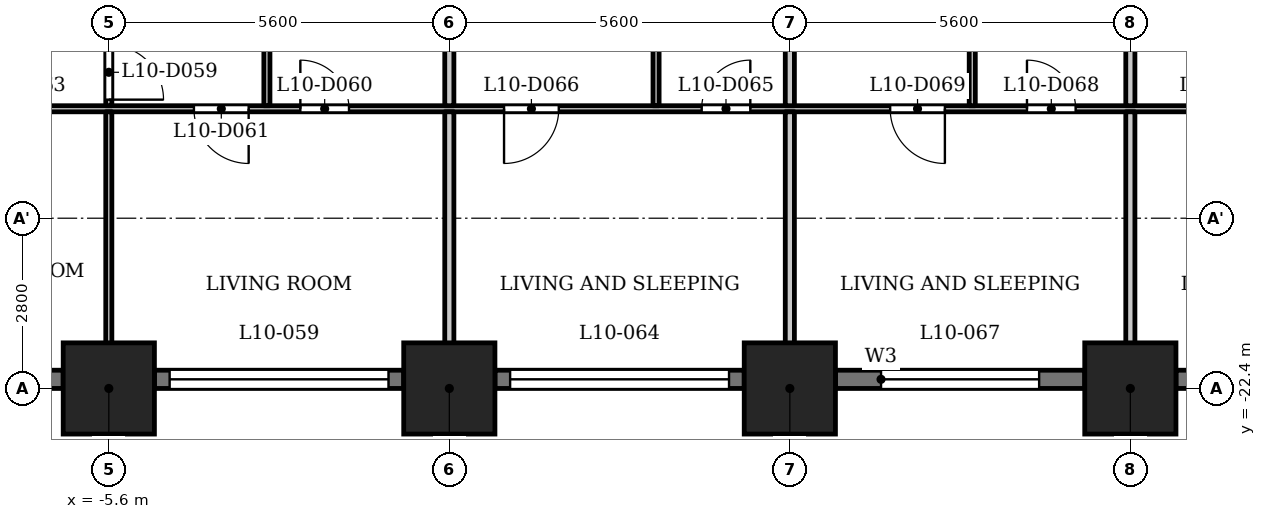
"""IFC4 building model, lengths in metres.
Left out: names, types, materials, properties, quantities, classifications, styles, units other than length and angle.
Written with IfcOpenShell. Run it as: python <this file> out.ifc"""

import sys

from ifc_helpers import new_model, si_unit, direction, frame, frame_2d, origin, origin_2d, place, context, subcontext, project, spatial, rectangle, extrude, element, fill, save


model = new_model("IFC4")
c1 = context("Model", 3, precision=1e-05, world=origin(), true_north=direction((0.0, 1.0)))
c2 = subcontext(c1, "Body", "Model", "MODEL_VIEW")
j1 = project(units=[si_unit("LENGTHUNIT", "METRE"), si_unit("PLANEANGLEUNIT", "RADIAN")], contexts=[c1])
p1 = place(None, origin())
s1 = spatial("IfcSite", under=j1, at=p1, CompositionType="ELEMENT")
p2 = place(p1, origin())
s2 = spatial("IfcBuilding", under=s1, at=p2, CompositionType="ELEMENT")
p3 = place(p2, frame((0.0, 0.0, 44.5)))
s3 = spatial("IfcBuildingStorey", under=s2, at=p3, CompositionType="ELEMENT", Elevation=44.5)
for number, where, z_axis, x_axis in (
    (1, (-5.6, -22.4, 0.0), (0.0, 0.0, 1.0), (1.0, 0.0, 0.0)),
    (2, (0.0, -22.4, 0.0), (0.0, 0.0, 1.0), (1.0, 0.0, 0.0)),
    (3, (5.6, -22.4, 0.0), (0.0, 0.0, 1.0), (1.0, 0.0, 0.0)),
    (4, (11.2, -22.4, 0.0), (0.0, 0.0, 1.0), (1.0, 0.0, 0.0)),
):
    element("IfcColumn", number, at=place(p3, frame(where, z_axis=z_axis, x_axis=x_axis)), inside=s3, PredefinedType="COLUMN", context=c2, shape_type="SweptSolid", body=[
        extrude(rectangle(XDim=1.5, YDim=1.5, at=origin_2d()), origin(), (0.0, 0.0, 1.0), 3.5),
    ])
p4 = place(p3, frame((-10.45, -22.25, 0.0), z_axis=(0.0, 0.0, 1.0), x_axis=(1.0, 0.0, 0.0)))
e5 = element("IfcWall", 5, at=p4, inside=s3, PredefinedType="SOLIDWALL", context=c2, shape_type="SweptSolid", body=[
    extrude(rectangle(XDim=4.1, YDim=0.3, at=frame_2d((2.05, 0.0))), origin(), (0.0, 0.0, 1.0), 2.35),
])
p5 = place(p4, frame((0.488, 0.0, 0.6)))
e6 = element("IfcOpeningElement", 6, at=p5, cuts=e5, PredefinedType="OPENING", context=c2, shape_type="SweptSolid", body=[
    extrude(rectangle(XDim=1.2, YDim=1.55, at=frame_2d((0.6, 0.775))), frame((0.0, 0.16, 0.0), z_axis=(0.0, -1.0, 0.0), x_axis=(1.0, 0.0, 0.0)), (0.0, 0.0, 1.0), 0.32),
])
p6 = place(p4, frame((2.613, 0.0, 0.6)))
e7 = element("IfcOpeningElement", 7, at=p6, cuts=e5, PredefinedType="OPENING", context=c2, shape_type="SweptSolid", body=[
    extrude(rectangle(XDim=1.2, YDim=1.55, at=frame_2d((0.6, 0.775))), frame((0.0, 0.16, 0.0), z_axis=(0.0, -1.0, 0.0), x_axis=(1.0, 0.0, 0.0)), (0.0, 0.0, 1.0), 0.32),
])
p7 = place(p3, frame((-4.85, -22.25, 0.0), z_axis=(0.0, 0.0, 1.0), x_axis=(1.0, 0.0, 0.0)))
e8 = element("IfcWall", 8, at=p7, inside=s3, PredefinedType="SOLIDWALL", context=c2, shape_type="SweptSolid", body=[
    extrude(rectangle(XDim=4.1, YDim=0.3, at=frame_2d((2.05, 0.0))), origin(), (0.0, 0.0, 1.0), 2.35),
])
p8 = place(p7, frame((0.25, 0.0, 1.2)))
e9 = element("IfcOpeningElement", 9, at=p8, cuts=e8, PredefinedType="OPENING", context=c2, shape_type="SweptSolid", body=[
    extrude(rectangle(XDim=3.6, YDim=0.95, at=frame_2d((1.8, 0.475))), frame((0.0, 0.16, 0.0), z_axis=(0.0, -1.0, 0.0), x_axis=(1.0, 0.0, 0.0)), (0.0, 0.0, 1.0), 0.32),
])
p9 = place(p3, frame((0.75, -22.25, 0.0), z_axis=(0.0, 0.0, 1.0), x_axis=(1.0, 0.0, 0.0)))
e10 = element("IfcWall", 10, at=p9, inside=s3, PredefinedType="SOLIDWALL", context=c2, shape_type="SweptSolid", body=[
    extrude(rectangle(XDim=4.1, YDim=0.3, at=frame_2d((2.05, 0.0))), origin(), (0.0, 0.0, 1.0), 2.35),
])
p10 = place(p9, frame((0.25, 0.0, 1.2)))
e11 = element("IfcOpeningElement", 11, at=p10, cuts=e10, PredefinedType="OPENING", context=c2, shape_type="SweptSolid", body=[
    extrude(rectangle(XDim=3.6, YDim=0.95, at=frame_2d((1.8, 0.475))), frame((0.0, 0.16, 0.0), z_axis=(0.0, -1.0, 0.0), x_axis=(1.0, 0.0, 0.0)), (0.0, 0.0, 1.0), 0.32),
])
p11 = place(p3, frame((6.35, -22.25, 0.0), z_axis=(0.0, 0.0, 1.0), x_axis=(1.0, 0.0, 0.0)))
e12 = element("IfcWall", 12, at=p11, inside=s3, PredefinedType="SOLIDWALL", context=c2, shape_type="SweptSolid", body=[
    extrude(rectangle(XDim=4.1, YDim=0.3, at=frame_2d((2.05, 0.0))), origin(), (0.0, 0.0, 1.0), 2.35),
])
p12 = place(p11, frame((0.75, 0.0, 0.9)))
e13 = element("IfcOpeningElement", 13, at=p12, cuts=e12, PredefinedType="OPENING", context=c2, shape_type="SweptSolid", body=[
    extrude(rectangle(XDim=2.6, YDim=1.25, at=frame_2d((1.3, 0.625))), frame((0.0, 0.16, 0.0), z_axis=(0.0, -1.0, 0.0), x_axis=(1.0, 0.0, 0.0)), (0.0, 0.0, 1.0), 0.32),
])
p13 = place(p3, frame((11.95, -22.25, 0.0), z_axis=(0.0, 0.0, 1.0), x_axis=(1.0, 0.0, 0.0)))
e14 = element("IfcWall", 14, at=p13, inside=s3, PredefinedType="SOLIDWALL", context=c2, shape_type="SweptSolid", body=[
    extrude(rectangle(XDim=4.1, YDim=0.3, at=frame_2d((2.05, 0.0))), origin(), (0.0, 0.0, 1.0), 2.35),
])
p14 = place(p13, frame((0.75, 0.0, 0.9)))
e15 = element("IfcOpeningElement", 15, at=p14, cuts=e14, PredefinedType="OPENING", context=c2, shape_type="SweptSolid", body=[
    extrude(rectangle(XDim=2.6, YDim=1.25, at=frame_2d((1.3, 0.625))), frame((0.0, 0.16, 0.0), z_axis=(0.0, -1.0, 0.0), x_axis=(1.0, 0.0, 0.0)), (0.0, 0.0, 1.0), 0.32),
])
p15 = place(p3, frame((-26.394, -17.8, 0.0), z_axis=(0.0, 0.0, 1.0), x_axis=(1.0, 0.0, 0.0)))
e16 = element("IfcWall", 16, at=p15, inside=s3, PredefinedType="PARTITIONING", context=c2, shape_type="SweptSolid", body=[
    extrude(rectangle(XDim=53.126, YDim=0.1, at=frame_2d((26.563, 0.0))), origin(), (0.0, 0.0, 1.0), 3.2),
])
p16 = place(p15, frame((0.794, 0.0, 0.0)))
e17 = element("IfcOpeningElement", 17, at=p16, cuts=e16, PredefinedType="OPENING", context=c2, shape_type="SweptSolid", body=[
    extrude(rectangle(XDim=0.8, YDim=2.1, at=frame_2d((0.4, 1.05))), frame((0.0, 0.06, 0.0), z_axis=(0.0, -1.0, 0.0), x_axis=(1.0, 0.0, 0.0)), (0.0, 0.0, 1.0), 0.12),
])
p17 = place(p15, frame((5.644, 0.0, 0.0)))
e18 = element("IfcOpeningElement", 18, at=p17, cuts=e16, PredefinedType="OPENING", context=c2, shape_type="SweptSolid", body=[
    extrude(rectangle(XDim=0.9, YDim=2.1, at=frame_2d((0.45, 1.05))), frame((0.0, 0.06, 0.0), z_axis=(0.0, -1.0, 0.0), x_axis=(1.0, 0.0, 0.0)), (0.0, 0.0, 1.0), 0.12),
])
p18 = place(p15, frame((10.394, 0.0, 0.0)))
e19 = element("IfcOpeningElement", 19, at=p18, cuts=e16, PredefinedType="OPENING", context=c2, shape_type="SweptSolid", body=[
    extrude(rectangle(XDim=0.8, YDim=2.1, at=frame_2d((0.4, 1.05))), frame((0.0, 0.06, 0.0), z_axis=(0.0, -1.0, 0.0), x_axis=(1.0, 0.0, 0.0)), (0.0, 0.0, 1.0), 0.12),
])
p19 = place(p15, frame((13.244, 0.0, 0.0)))
e20 = element("IfcOpeningElement", 20, at=p19, cuts=e16, PredefinedType="OPENING", context=c2, shape_type="SweptSolid", body=[
    extrude(rectangle(XDim=0.9, YDim=2.1, at=frame_2d((0.45, 1.05))), frame((0.0, 0.06, 0.0), z_axis=(0.0, -1.0, 0.0), x_axis=(1.0, 0.0, 0.0)), (0.0, 0.0, 1.0), 0.12),
])
p20 = place(p15, frame((23.944, 0.0, 0.0)))
e21 = element("IfcOpeningElement", 21, at=p20, cuts=e16, PredefinedType="OPENING", context=c2, shape_type="SweptSolid", body=[
    extrude(rectangle(XDim=0.8, YDim=2.1, at=frame_2d((0.4, 1.05))), frame((0.0, 0.06, 0.0), z_axis=(0.0, -1.0, 0.0), x_axis=(1.0, 0.0, 0.0)), (0.0, 0.0, 1.0), 0.12),
])
p21 = place(p15, frame((22.194, 0.0, 0.0)))
e22 = element("IfcOpeningElement", 22, at=p21, cuts=e16, PredefinedType="OPENING", context=c2, shape_type="SweptSolid", body=[
    extrude(rectangle(XDim=0.9, YDim=2.1, at=frame_2d((0.45, 1.05))), frame((0.0, 0.06, 0.0), z_axis=(0.0, -1.0, 0.0), x_axis=(1.0, 0.0, 0.0)), (0.0, 0.0, 1.0), 0.12),
])
p22 = place(p15, frame((16.594, 0.0, 0.0)))
e23 = element("IfcOpeningElement", 23, at=p22, cuts=e16, PredefinedType="OPENING", context=c2, shape_type="SweptSolid", body=[
    extrude(rectangle(XDim=0.9, YDim=2.1, at=frame_2d((0.45, 1.05))), frame((0.0, 0.06, 0.0), z_axis=(0.0, -1.0, 0.0), x_axis=(1.0, 0.0, 0.0)), (0.0, 0.0, 1.0), 0.12),
])
p23 = place(p15, frame((18.844, 0.0, 0.0)))
e24 = element("IfcOpeningElement", 24, at=p23, cuts=e16, PredefinedType="OPENING", context=c2, shape_type="SweptSolid", body=[
    extrude(rectangle(XDim=0.9, YDim=2.1, at=frame_2d((0.45, 1.05))), frame((0.0, 0.06, 0.0), z_axis=(0.0, -1.0, 0.0), x_axis=(1.0, 0.0, 0.0)), (0.0, 0.0, 1.0), 0.12),
])
p24 = place(p15, frame((30.544, 0.0, 0.0)))
e25 = element("IfcOpeningElement", 25, at=p24, cuts=e16, PredefinedType="OPENING", context=c2, shape_type="SweptSolid", body=[
    extrude(rectangle(XDim=0.8, YDim=2.1, at=frame_2d((0.4, 1.05))), frame((0.0, 0.06, 0.0), z_axis=(0.0, -1.0, 0.0), x_axis=(1.0, 0.0, 0.0)), (0.0, 0.0, 1.0), 0.12),
])
p25 = place(p15, frame((27.294, 0.0, 0.0)))
e26 = element("IfcOpeningElement", 26, at=p25, cuts=e16, PredefinedType="OPENING", context=c2, shape_type="SweptSolid", body=[
    extrude(rectangle(XDim=0.9, YDim=2.1, at=frame_2d((0.45, 1.05))), frame((0.0, 0.06, 0.0), z_axis=(0.0, -1.0, 0.0), x_axis=(1.0, 0.0, 0.0)), (0.0, 0.0, 1.0), 0.12),
])
p26 = place(p15, frame((35.894, 0.0, 0.0)))
e27 = element("IfcOpeningElement", 27, at=p26, cuts=e16, PredefinedType="OPENING", context=c2, shape_type="SweptSolid", body=[
    extrude(rectangle(XDim=0.8, YDim=2.1, at=frame_2d((0.4, 1.05))), frame((0.0, 0.06, 0.0), z_axis=(0.0, -1.0, 0.0), x_axis=(1.0, 0.0, 0.0)), (0.0, 0.0, 1.0), 0.12),
])
p27 = place(p15, frame((33.644, 0.0, 0.0)))
e28 = element("IfcOpeningElement", 28, at=p27, cuts=e16, PredefinedType="OPENING", context=c2, shape_type="SweptSolid", body=[
    extrude(rectangle(XDim=0.9, YDim=2.1, at=frame_2d((0.45, 1.05))), frame((0.0, 0.06, 0.0), z_axis=(0.0, -1.0, 0.0), x_axis=(1.0, 0.0, 0.0)), (0.0, 0.0, 1.0), 0.12),
])
p28 = place(p15, frame((41.494, 0.0, 0.0)))
e29 = element("IfcOpeningElement", 29, at=p28, cuts=e16, PredefinedType="OPENING", context=c2, shape_type="SweptSolid", body=[
    extrude(rectangle(XDim=0.8, YDim=2.1, at=frame_2d((0.4, 1.05))), frame((0.0, 0.06, 0.0), z_axis=(0.0, -1.0, 0.0), x_axis=(1.0, 0.0, 0.0)), (0.0, 0.0, 1.0), 0.12),
])
p29 = place(p15, frame((38.744, 0.0, 0.0)))
e30 = element("IfcOpeningElement", 30, at=p29, cuts=e16, PredefinedType="OPENING", context=c2, shape_type="SweptSolid", body=[
    extrude(rectangle(XDim=0.9, YDim=2.1, at=frame_2d((0.45, 1.05))), frame((0.0, 0.06, 0.0), z_axis=(0.0, -1.0, 0.0), x_axis=(1.0, 0.0, 0.0)), (0.0, 0.0, 1.0), 0.12),
])
p30 = place(p15, frame((49.362, 0.0, 0.0)))
e31 = element("IfcOpeningElement", 31, at=p30, cuts=e16, PredefinedType="OPENING", context=c2, shape_type="SweptSolid", body=[
    extrude(rectangle(XDim=0.8, YDim=2.1, at=frame_2d((0.4, 1.05))), frame((0.0, 0.06, 0.0), z_axis=(0.0, -1.0, 0.0), x_axis=(1.0, 0.0, 0.0)), (0.0, 0.0, 1.0), 0.12),
])
p31 = place(p15, frame((45.094, 0.0, 0.0)))
e32 = element("IfcOpeningElement", 32, at=p31, cuts=e16, PredefinedType="OPENING", context=c2, shape_type="SweptSolid", body=[
    extrude(rectangle(XDim=0.9, YDim=2.1, at=frame_2d((0.45, 1.05))), frame((0.0, 0.06, 0.0), z_axis=(0.0, -1.0, 0.0), x_axis=(1.0, 0.0, 0.0)), (0.0, 0.0, 1.0), 0.12),
])
p32 = place(p3, frame((-5.6, -23.13, 0.0), z_axis=(0.0, 0.0, 1.0), x_axis=(0.0, 1.0, 0.0)))
e33 = element("IfcWall", 33, at=p32, inside=s3, PredefinedType="PARTITIONING", context=c2, shape_type="SweptSolid", body=[
    extrude(rectangle(XDim=5.28, YDim=0.1, at=frame_2d((2.64, 0.0))), origin(), (0.0, 0.0, 1.0), 3.2),
])
p33 = place(p3, frame((-5.6, -17.75, 0.0), z_axis=(0.0, 0.0, 1.0), x_axis=(0.0, 1.0, 0.0)))
e34 = element("IfcWall", 34, at=p33, inside=s3, PredefinedType="PARTITIONING", context=c2, shape_type="SweptSolid", body=[
    extrude(rectangle(XDim=2.275, YDim=0.1, at=frame_2d((1.137, 0.0))), origin(), (0.0, 0.0, 1.0), 3.2),
])
p34 = place(p33, frame((0.1, 0.0, 0.0)))
e35 = element("IfcOpeningElement", 35, at=p34, cuts=e34, PredefinedType="OPENING", context=c2, shape_type="SweptSolid", body=[
    extrude(rectangle(XDim=0.9, YDim=2.1, at=frame_2d((0.45, 1.05))), frame((0.0, 0.06, 0.0), z_axis=(0.0, -1.0, 0.0), x_axis=(1.0, 0.0, 0.0)), (0.0, 0.0, 1.0), 0.12),
])
p35 = place(p3, frame((-3.0, -17.75, 0.0), z_axis=(0.0, 0.0, 1.0), x_axis=(0.0, 1.0, 0.0)))
e36 = element("IfcWall", 36, at=p35, inside=s3, PredefinedType="PARTITIONING", context=c2, shape_type="SweptSolid", body=[
    extrude(rectangle(XDim=2.275, YDim=0.1, at=frame_2d((1.137, 0.0))), origin(), (0.0, 0.0, 1.0), 3.2),
])
p36 = place(p3, frame((0.0, -23.13, 0.0), z_axis=(0.0, 0.0, 1.0), x_axis=(0.0, 1.0, 0.0)))
e37 = element("IfcWall", 37, at=p36, inside=s3, PredefinedType="PARTITIONING", context=c2, shape_type="SweptSolid", body=[
    extrude(rectangle(XDim=5.28, YDim=0.15, at=frame_2d((2.64, 0.0))), origin(), (0.0, 0.0, 1.0), 3.2),
])
p37 = place(p3, frame((0.0, -17.75, 0.0), z_axis=(0.0, 0.0, 1.0), x_axis=(0.0, 1.0, 0.0)))
e38 = element("IfcWall", 38, at=p37, inside=s3, PredefinedType="PARTITIONING", context=c2, shape_type="SweptSolid", body=[
    extrude(rectangle(XDim=2.275, YDim=0.15, at=frame_2d((1.137, 0.0))), origin(), (0.0, 0.0, 1.0), 3.2),
])
p38 = place(p3, frame((3.4, -17.75, 0.0), z_axis=(0.0, 0.0, 1.0), x_axis=(0.0, 1.0, 0.0)))
e39 = element("IfcWall", 39, at=p38, inside=s3, PredefinedType="PARTITIONING", context=c2, shape_type="SweptSolid", body=[
    extrude(rectangle(XDim=2.275, YDim=0.1, at=frame_2d((1.137, 0.0))), origin(), (0.0, 0.0, 1.0), 3.2),
])
p39 = place(p3, frame((5.6, -23.13, 0.0), z_axis=(0.0, 0.0, 1.0), x_axis=(0.0, 1.0, 0.0)))
e40 = element("IfcWall", 40, at=p39, inside=s3, PredefinedType="PARTITIONING", context=c2, shape_type="SweptSolid", body=[
    extrude(rectangle(XDim=5.28, YDim=0.15, at=frame_2d((2.64, 0.0))), origin(), (0.0, 0.0, 1.0), 3.2),
])
p40 = place(p3, frame((5.6, -17.75, 0.0), z_axis=(0.0, 0.0, 1.0), x_axis=(0.0, 1.0, 0.0)))
e41 = element("IfcWall", 41, at=p40, inside=s3, PredefinedType="PARTITIONING", context=c2, shape_type="SweptSolid", body=[
    extrude(rectangle(XDim=2.275, YDim=0.15, at=frame_2d((1.137, 0.0))), origin(), (0.0, 0.0, 1.0), 3.2),
])
p41 = place(p3, frame((8.6, -17.75, 0.0), z_axis=(0.0, 0.0, 1.0), x_axis=(0.0, 1.0, 0.0)))
e42 = element("IfcWall", 42, at=p41, inside=s3, PredefinedType="PARTITIONING", context=c2, shape_type="SweptSolid", body=[
    extrude(rectangle(XDim=2.275, YDim=0.1, at=frame_2d((1.137, 0.0))), origin(), (0.0, 0.0, 1.0), 3.2),
])
p42 = place(p3, frame((11.2, -23.13, 0.0), z_axis=(0.0, 0.0, 1.0), x_axis=(0.0, 1.0, 0.0)))
e43 = element("IfcWall", 43, at=p42, inside=s3, PredefinedType="PARTITIONING", context=c2, shape_type="SweptSolid", body=[
    extrude(rectangle(XDim=5.28, YDim=0.15, at=frame_2d((2.64, 0.0))), origin(), (0.0, 0.0, 1.0), 3.2),
])
p43 = place(p3, frame((11.2, -17.75, 0.0), z_axis=(0.0, 0.0, 1.0), x_axis=(0.0, 1.0, 0.0)))
e44 = element("IfcWall", 44, at=p43, inside=s3, PredefinedType="PARTITIONING", context=c2, shape_type="SweptSolid", body=[
    extrude(rectangle(XDim=2.275, YDim=0.15, at=frame_2d((1.137, 0.0))), origin(), (0.0, 0.0, 1.0), 3.2),
])
p44 = place(p34, origin())
e45 = element("IfcDoor", 45, at=p44, inside=s3, OperationType="SINGLE_SWING_LEFT", PredefinedType="DOOR", context=c2, shape_type="SweptSolid", body=[
    extrude(rectangle(XDim=0.9, YDim=2.1, at=frame_2d((0.45, 1.05))), frame((0.0, 0.025, 0.0), z_axis=(0.0, -1.0, 0.0), x_axis=(1.0, 0.0, 0.0)), (0.0, 0.0, 1.0), 0.05),
])
fill(e35, e45)
p45 = place(p20, origin())
e46 = element("IfcDoor", 46, at=p45, inside=s3, OperationType="SINGLE_SWING_RIGHT", PredefinedType="DOOR", context=c2, shape_type="SweptSolid", body=[
    extrude(rectangle(XDim=0.8, YDim=2.1, at=frame_2d((0.4, 1.05))), frame((0.0, 0.025, 0.0), z_axis=(0.0, -1.0, 0.0), x_axis=(1.0, 0.0, 0.0)), (0.0, 0.0, 1.0), 0.05),
])
fill(e21, e46)
p46 = place(p21, origin())
e47 = element("IfcDoor", 47, at=p46, inside=s3, OperationType="SINGLE_SWING_RIGHT", PredefinedType="DOOR", context=c2, shape_type="SweptSolid", body=[
    extrude(rectangle(XDim=0.9, YDim=2.1, at=frame_2d((0.45, 1.05))), frame((0.0, 0.025, 0.0), z_axis=(0.0, -1.0, 0.0), x_axis=(1.0, 0.0, 0.0)), (0.0, 0.0, 1.0), 0.05),
])
fill(e22, e47)
p47 = place(p24, origin())
e48 = element("IfcDoor", 48, at=p47, inside=s3, OperationType="SINGLE_SWING_LEFT", PredefinedType="DOOR", context=c2, shape_type="SweptSolid", body=[
    extrude(rectangle(XDim=0.8, YDim=2.1, at=frame_2d((0.4, 1.05))), frame((0.0, 0.025, 0.0), z_axis=(0.0, -1.0, 0.0), x_axis=(1.0, 0.0, 0.0)), (0.0, 0.0, 1.0), 0.05),
])
fill(e25, e48)
p48 = place(p25, origin())
e49 = element("IfcDoor", 49, at=p48, inside=s3, OperationType="SINGLE_SWING_LEFT", PredefinedType="DOOR", context=c2, shape_type="SweptSolid", body=[
    extrude(rectangle(XDim=0.9, YDim=2.1, at=frame_2d((0.45, 1.05))), frame((0.0, 0.025, 0.0), z_axis=(0.0, -1.0, 0.0), x_axis=(1.0, 0.0, 0.0)), (0.0, 0.0, 1.0), 0.05),
])
fill(e26, e49)
p49 = place(p26, origin())
e50 = element("IfcDoor", 50, at=p49, inside=s3, OperationType="SINGLE_SWING_RIGHT", PredefinedType="DOOR", context=c2, shape_type="SweptSolid", body=[
    extrude(rectangle(XDim=0.8, YDim=2.1, at=frame_2d((0.4, 1.05))), frame((0.0, 0.025, 0.0), z_axis=(0.0, -1.0, 0.0), x_axis=(1.0, 0.0, 0.0)), (0.0, 0.0, 1.0), 0.05),
])
fill(e27, e50)
p50 = place(p27, origin())
e51 = element("IfcDoor", 51, at=p50, inside=s3, OperationType="SINGLE_SWING_RIGHT", PredefinedType="DOOR", context=c2, shape_type="SweptSolid", body=[
    extrude(rectangle(XDim=0.9, YDim=2.1, at=frame_2d((0.45, 1.05))), frame((0.0, 0.025, 0.0), z_axis=(0.0, -1.0, 0.0), x_axis=(1.0, 0.0, 0.0)), (0.0, 0.0, 1.0), 0.05),
])
fill(e28, e51)
p51 = place(p8, origin())
e52 = element("IfcWindow", 52, at=p51, inside=s3, PartitioningType="SINGLE_PANEL", PredefinedType="WINDOW", context=c2, shape_type="SweptSolid", body=[
    extrude(rectangle(XDim=3.6, YDim=0.95, at=frame_2d((1.8, 0.475))), frame((0.0, 0.03, 0.0), z_axis=(0.0, -1.0, 0.0), x_axis=(1.0, 0.0, 0.0)), (0.0, 0.0, 1.0), 0.06),
])
fill(e9, e52)
p52 = place(p10, origin())
e53 = element("IfcWindow", 53, at=p52, inside=s3, PartitioningType="SINGLE_PANEL", PredefinedType="WINDOW", context=c2, shape_type="SweptSolid", body=[
    extrude(rectangle(XDim=3.6, YDim=0.95, at=frame_2d((1.8, 0.475))), frame((0.0, 0.03, 0.0), z_axis=(0.0, -1.0, 0.0), x_axis=(1.0, 0.0, 0.0)), (0.0, 0.0, 1.0), 0.06),
])
fill(e11, e53)
p53 = place(p12, origin())
e54 = element("IfcWindow", 54, at=p53, inside=s3, PartitioningType="SINGLE_PANEL", PredefinedType="WINDOW", context=c2, shape_type="SweptSolid", body=[
    extrude(rectangle(XDim=2.6, YDim=1.25, at=frame_2d((1.3, 0.625))), frame((0.0, 0.03, 0.0), z_axis=(0.0, -1.0, 0.0), x_axis=(1.0, 0.0, 0.0)), (0.0, 0.0, 1.0), 0.06),
])
fill(e13, e54)
save(model, sys.argv[1])
